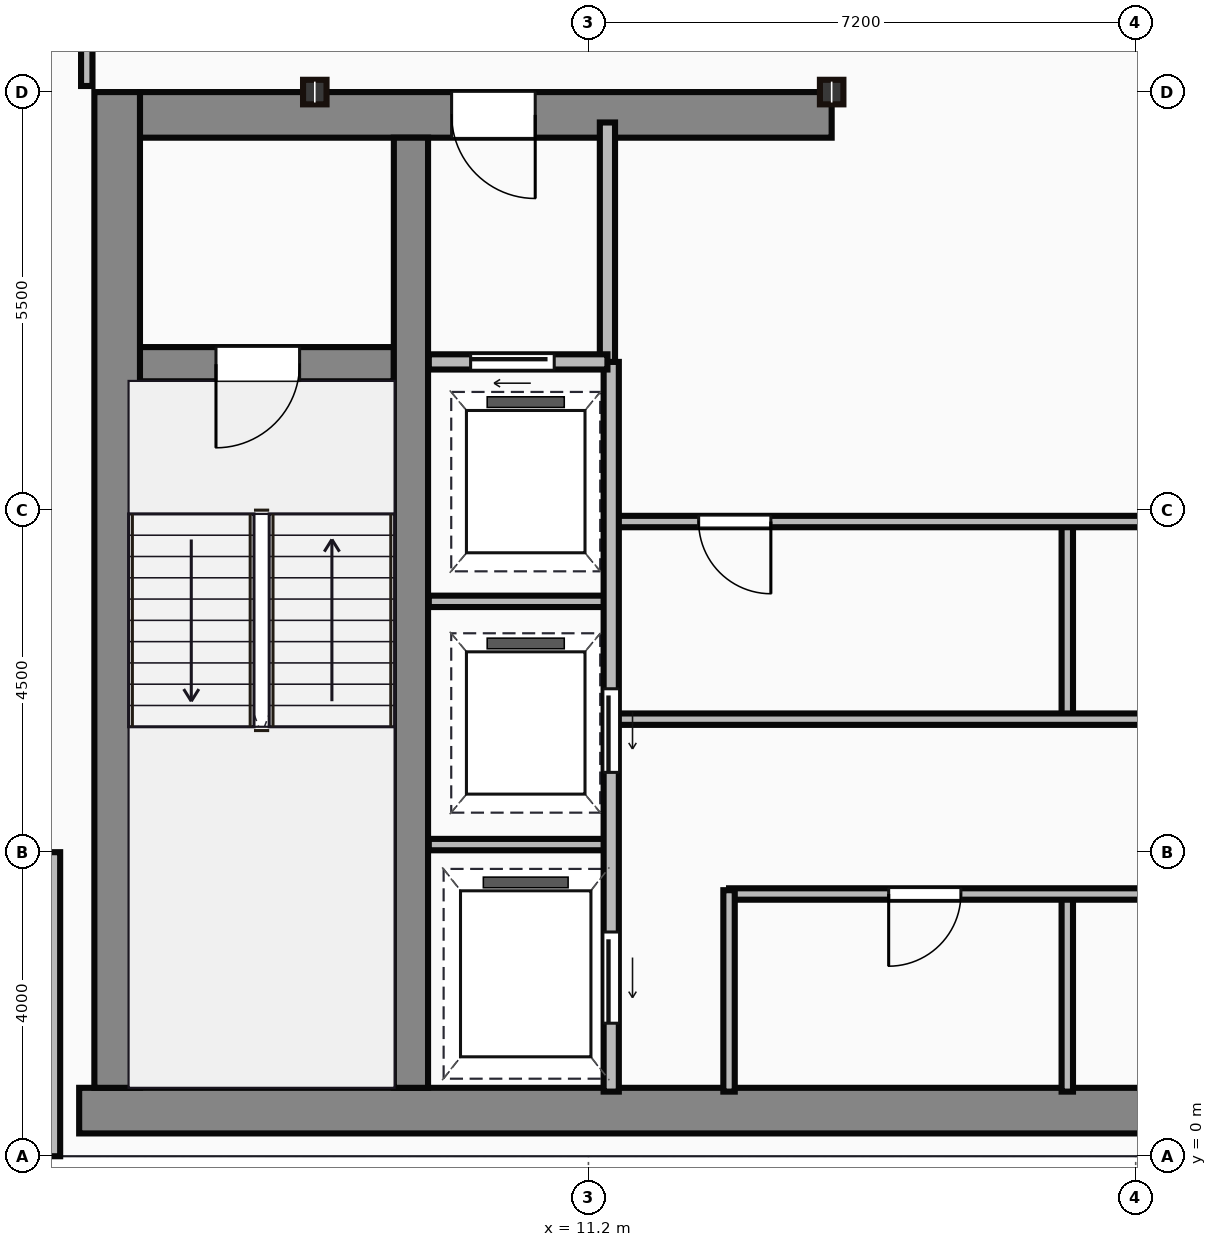
"""IFC4 building model, lengths in metres.
Left out: names, types, materials, properties, quantities, classifications, styles, units other than length and angle.
Written with IfcOpenShell. Run it as: python <this file> out.ifc"""

import sys

from ifc_helpers import new_model, si_unit, direction, frame, frame_2d, origin, origin_2d, place, context, subcontext, project, spatial, rectangle, i_section, extrude, source, transform, mapped, element, fill, save


model = new_model("IFC4")
c1 = context("Model", 3, precision=1e-05, world=origin(), true_north=direction((0.0, 1.0)))
c2 = subcontext(c1, "Body", "Model", "MODEL_VIEW")
j1 = project(units=[si_unit("LENGTHUNIT", "METRE"), si_unit("PLANEANGLEUNIT", "RADIAN")], contexts=[c1])
p1 = place(None, origin())
s1 = spatial("IfcSite", under=j1, at=p1, CompositionType="ELEMENT")
p2 = place(p1, origin())
s2 = spatial("IfcBuilding", under=s1, at=p2, CompositionType="ELEMENT")
p3 = place(p2, frame((0.0, 0.0, 280.7)))
s3 = spatial("IfcBuildingStorey", under=s2, at=p3, CompositionType="ELEMENT", Elevation=280.7)
m1 = source(origin(), c2, "Body", "SweptSolid", [
    extrude(rectangle(XDim=29.5, YDim=0.6, at=frame_2d((14.75, 0.0))), origin(), (0.0, 0.0, 1.0), 3.65),
])
p4 = place(p3, frame((4.5, 0.6, 0.0), z_axis=(0.0, 0.0, 1.0), x_axis=(1.0, 0.0, 0.0)))
e1 = element("IfcWall", 1, at=p4, inside=s3, PredefinedType="SHEAR", context=c2, shape_type="MappedRepresentation", body=[
    mapped(m1, transform((0.0, 0.0, 0.0))),
])
m2 = source(origin(), c2, "Body", "SweptSolid", [
    extrude(rectangle(XDim=13.1, YDim=0.6, at=frame_2d((6.55, 0.0))), origin(), (0.0, 0.0, 1.0), 3.65),
])
p5 = place(p3, frame((5.0, 0.9, 0.0), z_axis=(0.0, 0.0, 1.0), x_axis=(0.0, 1.0, 0.0)))
e2 = element("IfcWall", 2, at=p5, inside=s3, PredefinedType="SHEAR", context=c2, shape_type="MappedRepresentation", body=[
    mapped(m2, transform((0.0, 0.0, 0.0))),
])
m3 = source(origin(), c2, "Body", "SweptSolid", [
    extrude(rectangle(XDim=9.1, YDim=0.6, at=frame_2d((4.55, 0.0))), origin(), (0.0, 0.0, 1.0), 3.65),
])
p6 = place(p3, frame((5.3, 13.7, 0.0), z_axis=(0.0, 0.0, 1.0), x_axis=(1.0, 0.0, 0.0)))
e3 = element("IfcWall", 3, at=p6, inside=s3, PredefinedType="SHEAR", context=c2, shape_type="MappedRepresentation", body=[
    mapped(m3, transform((0.0, 0.0, 0.0))),
])
p7 = place(p6, frame((4.1, 0.0, 0.0)))
e4 = element("IfcOpeningElement", 4, at=p7, cuts=e3, PredefinedType="OPENING", context=c2, shape_type="SweptSolid", body=[
    extrude(rectangle(XDim=1.1, YDim=2.15, at=frame_2d((0.55, 1.075))), frame((0.0, 0.31, 0.0), z_axis=(0.0, -1.0, 0.0), x_axis=(1.0, 0.0, 0.0)), (0.0, 0.0, 1.0), 0.62),
])
m4 = source(origin(), c2, "Body", "SweptSolid", [
    extrude(rectangle(XDim=12.5, YDim=0.45, at=frame_2d((6.25, 0.0))), origin(), (0.0, 0.0, 1.0), 3.65),
])
p8 = place(p3, frame((8.865, 0.9, 0.0), z_axis=(0.0, 0.0, 1.0), x_axis=(0.0, 1.0, 0.0)))
e5 = element("IfcWall", 5, at=p8, inside=s3, PredefinedType="SHEAR", context=c2, shape_type="MappedRepresentation", body=[
    mapped(m4, transform((0.0, 0.0, 0.0))),
])
m5 = source(origin(), c2, "Body", "SweptSolid", [
    extrude(rectangle(XDim=3.39, YDim=0.45, at=frame_2d((1.695, 0.0))), origin(), (0.0, 0.0, 1.0), 3.65),
])
p9 = place(p3, frame((5.25, 10.42, 0.0), z_axis=(0.0, 0.0, 1.0), x_axis=(1.0, 0.0, 0.0)))
e6 = element("IfcWall", 6, at=p9, inside=s3, PredefinedType="SHEAR", context=c2, shape_type="MappedRepresentation", body=[
    mapped(m5, transform((0.0, 0.0, 0.0))),
])
p10 = place(p9, frame((1.05, 0.0, 0.0)))
e7 = element("IfcOpeningElement", 7, at=p10, cuts=e6, PredefinedType="OPENING", context=c2, shape_type="SweptSolid", body=[
    extrude(rectangle(XDim=1.1, YDim=2.15, at=frame_2d((0.55, 1.075))), frame((0.0, 0.235, 0.0), z_axis=(0.0, -1.0, 0.0), x_axis=(1.0, 0.0, 0.0)), (0.0, 0.0, 1.0), 0.47),
])
m6 = source(origin(), c2, "Body", "SweptSolid", [
    extrude(i_section(OverallWidth=0.309, OverallDepth=0.323, WebThickness=0.014, FlangeThickness=0.023, at=origin_2d()), origin(), (0.0, 0.0, 1.0), 3.65),
])
for number, where, z_axis, x_axis in (
    (8, (7.6, 14.0, 0.0), (0.0, 0.0, 1.0), (1.0, 0.0, 0.0)),
    (9, (14.4, 14.0, 0.0), (0.0, 0.0, 1.0), (1.0, 0.0, 0.0)),
):
    element("IfcColumn", number, at=place(p3, frame(where, z_axis=z_axis, x_axis=x_axis)), inside=s3, PredefinedType="COLUMN", context=c2, shape_type="MappedRepresentation", body=[
        mapped(m6, transform((0.0, 0.0, 0.0))),
    ])
m7 = source(origin(), c2, "Body", "SweptSolid", [
    extrude(rectangle(XDim=4.0, YDim=0.25, at=frame_2d((2.0, 0.0))), origin(), (0.0, 0.0, 1.0), 3.4),
])
p11 = place(p3, frame((4.125, 4.0, 0.0), z_axis=(0.0, 0.0, 1.0), x_axis=(0.0, -1.0, 0.0)))
e10 = element("IfcWall", 10, at=p11, inside=s3, PredefinedType="STANDARD", context=c2, shape_type="MappedRepresentation", body=[
    mapped(m7, transform((0.0, 0.0, 0.0))),
])
m8 = source(origin(), c2, "Body", "SweptSolid", [
    extrude(rectangle(XDim=3.18, YDim=0.2, at=frame_2d((1.59, 0.0))), origin(), (0.0, 0.0, 1.0), 3.4),
])
p12 = place(p3, frame((11.45, 10.42, 0.0), z_axis=(0.0, 0.0, 1.0), x_axis=(0.0, 1.0, 0.0)))
e11 = element("IfcWall", 11, at=p12, inside=s3, PredefinedType="PARTITIONING", context=c2, shape_type="MappedRepresentation", body=[
    mapped(m8, transform((0.0, 0.0, 0.0))),
])
m9 = source(origin(), c2, "Body", "SweptSolid", [
    extrude(rectangle(XDim=2.35, YDim=0.2, at=frame_2d((1.175, 0.0))), origin(), (0.0, 0.0, 1.0), 3.4),
])
p13 = place(p3, frame((9.1, 10.45, 0.0), z_axis=(0.0, 0.0, 1.0), x_axis=(1.0, 0.0, 0.0)))
e12 = element("IfcWall", 12, at=p13, inside=s3, PredefinedType="PARTITIONING", context=c2, shape_type="MappedRepresentation", body=[
    mapped(m9, transform((0.0, 0.0, 0.0))),
])
p14 = place(p13, frame((0.55, 0.0, 0.0)))
e13 = element("IfcOpeningElement", 13, at=p14, cuts=e12, PredefinedType="OPENING", context=c2, shape_type="SweptSolid", body=[
    extrude(rectangle(XDim=1.1, YDim=2.15, at=frame_2d((0.55, 1.075))), frame((0.0, 0.11, 0.0), z_axis=(0.0, -1.0, 0.0), x_axis=(1.0, 0.0, 0.0)), (0.0, 0.0, 1.0), 0.22),
])
m10 = source(origin(), c2, "Body", "SweptSolid", [
    extrude(rectangle(XDim=9.6, YDim=0.2, at=frame_2d((4.8, 0.0))), origin(), (0.0, 0.0, 1.0), 3.4),
])
p15 = place(p3, frame((11.5, 0.85, 0.0), z_axis=(0.0, 0.0, 1.0), x_axis=(0.0, 1.0, 0.0)))
e14 = element("IfcWall", 14, at=p15, inside=s3, PredefinedType="PARTITIONING", context=c2, shape_type="MappedRepresentation", body=[
    mapped(m10, transform((0.0, 0.0, 0.0))),
])
p16 = place(p15, frame((4.2, 0.0, 0.0)))
e15 = element("IfcOpeningElement", 15, at=p16, cuts=e14, PredefinedType="OPENING", context=c2, shape_type="SweptSolid", body=[
    extrude(rectangle(XDim=1.1, YDim=2.15, at=frame_2d((0.55, 1.075))), frame((0.0, 0.11, 0.0), z_axis=(0.0, -1.0, 0.0), x_axis=(1.0, 0.0, 0.0)), (0.0, 0.0, 1.0), 0.22),
])
p17 = place(p15, frame((0.9, 0.0, 0.0)))
e16 = element("IfcOpeningElement", 16, at=p17, cuts=e14, PredefinedType="OPENING", context=c2, shape_type="SweptSolid", body=[
    extrude(rectangle(XDim=1.2, YDim=2.15, at=frame_2d((0.6, 1.075))), frame((0.0, 0.11, 0.0), z_axis=(0.0, -1.0, 0.0), x_axis=(1.0, 0.0, 0.0)), (0.0, 0.0, 1.0), 0.22),
])
m11 = source(origin(), c2, "Body", "SweptSolid", [
    extrude(rectangle(XDim=2.4, YDim=0.15, at=frame_2d((1.2, 0.0))), origin(), (0.0, 0.0, 1.0), 3.4),
])
for number, where, z_axis, x_axis in (
    (17, (9.1, 4.1, 0.0), (0.0, 0.0, 1.0), (1.0, 0.0, 0.0)),
    (18, (9.1, 7.3, 0.0), (0.0, 0.0, 1.0), (1.0, 0.0, 0.0)),
):
    element("IfcWall", number, at=place(p3, frame(where, z_axis=z_axis, x_axis=x_axis)), inside=s3, PredefinedType="PARTITIONING", context=c2, shape_type="MappedRepresentation", body=[
        mapped(m11, transform((0.0, 0.0, 0.0))),
    ])
m12 = source(origin(), c2, "Body", "SweptSolid", [
    extrude(rectangle(XDim=2.65, YDim=0.15, at=frame_2d((1.325, 0.0))), origin(), (0.0, 0.0, 1.0), 3.4),
])
p18 = place(p3, frame((13.05, 0.85, 0.0), z_axis=(0.0, 0.0, 1.0), x_axis=(0.0, 1.0, 0.0)))
e19 = element("IfcWall", 19, at=p18, inside=s3, PredefinedType="PARTITIONING", context=c2, shape_type="MappedRepresentation", body=[
    mapped(m12, transform((0.0, 0.0, 0.0))),
])
m13 = source(origin(), c2, "Body", "SweptSolid", [
    extrude(rectangle(XDim=10.35, YDim=0.15, at=frame_2d((5.175, 0.0))), origin(), (0.0, 0.0, 1.0), 3.4),
])
p19 = place(p3, frame((13.05, 3.45, 0.0), z_axis=(0.0, 0.0, 1.0), x_axis=(1.0, 0.0, 0.0)))
e20 = element("IfcWall", 20, at=p19, inside=s3, PredefinedType="PARTITIONING", context=c2, shape_type="MappedRepresentation", body=[
    mapped(m13, transform((0.0, 0.0, 0.0))),
])
p20 = place(p19, frame((2.1, 0.0, 0.0)))
e21 = element("IfcOpeningElement", 21, at=p20, cuts=e20, PredefinedType="OPENING", context=c2, shape_type="SweptSolid", body=[
    extrude(rectangle(XDim=0.95, YDim=2.15, at=frame_2d((0.475, 1.075))), frame((0.0, 0.085, 0.0), z_axis=(0.0, -1.0, 0.0), x_axis=(1.0, 0.0, 0.0)), (0.0, 0.0, 1.0), 0.17),
])
p21 = place(p19, frame((6.8, 0.0, 0.0)))
e22 = element("IfcOpeningElement", 22, at=p21, cuts=e20, PredefinedType="OPENING", context=c2, shape_type="SweptSolid", body=[
    extrude(rectangle(XDim=0.95, YDim=2.15, at=frame_2d((0.475, 1.075))), frame((0.0, 0.085, 0.0), z_axis=(0.0, -1.0, 0.0), x_axis=(1.0, 0.0, 0.0)), (0.0, 0.0, 1.0), 0.17),
])
m14 = source(origin(), c2, "Body", "SweptSolid", [
    extrude(rectangle(XDim=2.6, YDim=0.15, at=frame_2d((1.3, 0.0))), origin(), (0.0, 0.0, 1.0), 3.4),
])
p22 = place(p3, frame((17.5, 0.85, 0.0), z_axis=(0.0, 0.0, 1.0), x_axis=(0.0, 1.0, 0.0)))
e23 = element("IfcWall", 23, at=p22, inside=s3, PredefinedType="PARTITIONING", context=c2, shape_type="MappedRepresentation", body=[
    mapped(m14, transform((0.0, 0.0, 0.0))),
])
m15 = source(origin(), c2, "Body", "SweptSolid", [
    extrude(rectangle(XDim=11.85, YDim=0.15, at=frame_2d((5.925, 0.0))), origin(), (0.0, 0.0, 1.0), 3.4),
])
p23 = place(p3, frame((11.55, 5.75, 0.0), z_axis=(0.0, 0.0, 1.0), x_axis=(1.0, 0.0, 0.0)))
e24 = element("IfcWall", 24, at=p23, inside=s3, PredefinedType="PARTITIONING", context=c2, shape_type="MappedRepresentation", body=[
    mapped(m15, transform((0.0, 0.0, 0.0))),
])
p24 = place(p3, frame((11.55, 8.35, 0.0), z_axis=(0.0, 0.0, 1.0), x_axis=(1.0, 0.0, 0.0)))
e25 = element("IfcWall", 25, at=p24, inside=s3, PredefinedType="PARTITIONING", context=c2, shape_type="MappedRepresentation", body=[
    mapped(m15, transform((0.0, 0.0, 0.0))),
])
p25 = place(p24, frame((1.1, 0.0, 0.0)))
e26 = element("IfcOpeningElement", 26, at=p25, cuts=e25, PredefinedType="OPENING", context=c2, shape_type="SweptSolid", body=[
    extrude(rectangle(XDim=0.95, YDim=2.15, at=frame_2d((0.475, 1.075))), frame((0.0, 0.085, 0.0), z_axis=(0.0, -1.0, 0.0), x_axis=(1.0, 0.0, 0.0)), (0.0, 0.0, 1.0), 0.17),
])
p26 = place(p24, frame((9.4, 0.0, 0.0)))
e27 = element("IfcOpeningElement", 27, at=p26, cuts=e25, PredefinedType="OPENING", context=c2, shape_type="SweptSolid", body=[
    extrude(rectangle(XDim=0.95, YDim=2.15, at=frame_2d((0.475, 1.075))), frame((0.0, 0.085, 0.0), z_axis=(0.0, -1.0, 0.0), x_axis=(1.0, 0.0, 0.0)), (0.0, 0.0, 1.0), 0.17),
])
m16 = source(origin(), c2, "Body", "SweptSolid", [
    extrude(rectangle(XDim=2.5, YDim=0.15, at=frame_2d((1.25, 0.0))), origin(), (0.0, 0.0, 1.0), 3.4),
])
p27 = place(p3, frame((17.5, 5.8, 0.0), z_axis=(0.0, 0.0, 1.0), x_axis=(0.0, 1.0, 0.0)))
e28 = element("IfcWall", 28, at=p27, inside=s3, PredefinedType="PARTITIONING", context=c2, shape_type="MappedRepresentation", body=[
    mapped(m16, transform((0.0, 0.0, 0.0))),
])
m17 = source(origin(), c2, "Body", "SweptSolid", [
    extrude(rectangle(XDim=2.12, YDim=0.15, at=frame_2d((1.06, 0.0))), origin(), (0.0, 0.0, 1.0), 3.4),
])
p28 = place(p3, frame((4.6, 14.08, 0.0), z_axis=(0.0, 0.0, 1.0), x_axis=(0.0, 1.0, 0.0)))
e29 = element("IfcWall", 29, at=p28, inside=s3, PredefinedType="PARTITIONING", context=c2, shape_type="MappedRepresentation", body=[
    mapped(m17, transform((0.0, 0.0, 0.0))),
])
m18 = source(origin(), c2, "Body", "SweptSolid", [
    extrude(rectangle(XDim=1.1, YDim=2.15, at=frame_2d((0.55, 1.075))), frame((0.0, 0.025, 0.0), z_axis=(0.0, -1.0, 0.0), x_axis=(1.0, 0.0, 0.0)), (0.0, 0.0, 1.0), 0.05),
])
p29 = place(p10, frame((1.1, 0.0, 0.0), z_axis=(0.0, 0.0, 1.0), x_axis=(-1.0, 0.0, 0.0)))
e30 = element("IfcDoor", 30, at=p29, inside=s3, OperationType="SINGLE_SWING_LEFT", PredefinedType="DOOR", context=c2, shape_type="MappedRepresentation", body=[
    mapped(m18, transform((0.0, 0.0, 0.0))),
])
fill(e7, e30)
p30 = place(p7, origin())
e31 = element("IfcDoor", 31, at=p30, inside=s3, OperationType="SINGLE_SWING_RIGHT", PredefinedType="DOOR", context=c2, shape_type="MappedRepresentation", body=[
    mapped(m18, transform((0.0, 0.0, 0.0))),
])
fill(e4, e31)
p31 = place(p14, origin())
e32 = element("IfcDoor", 32, at=p31, inside=s3, OperationType="SLIDING_TO_LEFT", PredefinedType="DOOR", context=c2, shape_type="MappedRepresentation", body=[
    mapped(m18, transform((0.0, 0.0, 0.0))),
])
fill(e13, e32)
p32 = place(p16, frame((1.1, 0.0, 0.0), z_axis=(0.0, 0.0, 1.0), x_axis=(-1.0, 0.0, 0.0)))
e33 = element("IfcDoor", 33, at=p32, inside=s3, OperationType="SLIDING_TO_LEFT", PredefinedType="DOOR", context=c2, shape_type="MappedRepresentation", body=[
    mapped(m18, transform((0.0, 0.0, 0.0))),
])
fill(e15, e33)
m19 = source(origin(), c2, "Body", "SweptSolid", [
    extrude(rectangle(XDim=1.2, YDim=2.15, at=frame_2d((0.6, 1.075))), frame((0.0, 0.025, 0.0), z_axis=(0.0, -1.0, 0.0), x_axis=(1.0, 0.0, 0.0)), (0.0, 0.0, 1.0), 0.05),
])
p33 = place(p17, frame((1.2, 0.0, 0.0), z_axis=(0.0, 0.0, 1.0), x_axis=(-1.0, 0.0, 0.0)))
e34 = element("IfcDoor", 34, at=p33, inside=s3, OperationType="SLIDING_TO_LEFT", PredefinedType="DOOR", context=c2, shape_type="MappedRepresentation", body=[
    mapped(m19, transform((0.0, 0.0, 0.0))),
])
fill(e16, e34)
m20 = source(origin(), c2, "Body", "SweptSolid", [
    extrude(rectangle(XDim=0.95, YDim=2.15, at=frame_2d((0.475, 1.075))), frame((0.0, 0.025, 0.0), z_axis=(0.0, -1.0, 0.0), x_axis=(1.0, 0.0, 0.0)), (0.0, 0.0, 1.0), 0.05),
])
p34 = place(p20, origin())
e35 = element("IfcDoor", 35, at=p34, inside=s3, OperationType="SINGLE_SWING_LEFT", PredefinedType="DOOR", context=c2, shape_type="MappedRepresentation", body=[
    mapped(m20, transform((0.0, 0.0, 0.0))),
])
fill(e21, e35)
p35 = place(p25, origin())
e36 = element("IfcDoor", 36, at=p35, inside=s3, OperationType="SINGLE_SWING_RIGHT", PredefinedType="DOOR", context=c2, shape_type="MappedRepresentation", body=[
    mapped(m20, transform((0.0, 0.0, 0.0))),
])
fill(e26, e36)
save(model, sys.argv[1])
